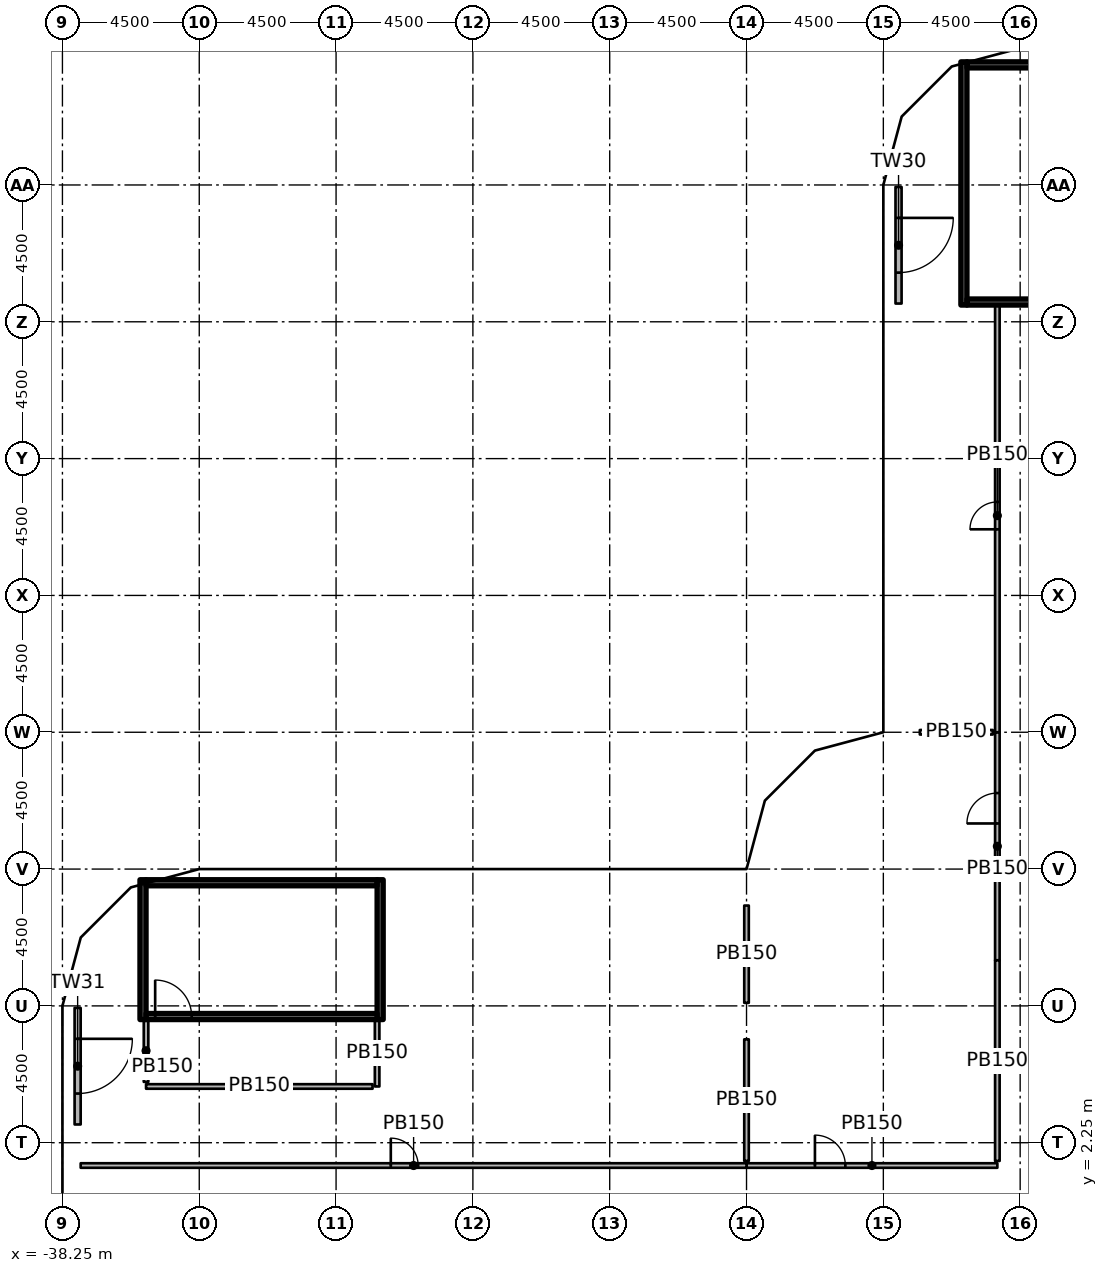
"""IFC4 building model, lengths in metres.
Left out: names, types, materials, properties, quantities, classifications, styles, units other than length and angle.
Written with IfcOpenShell. Run it as: python <this file> out.ifc"""

import sys

from ifc_helpers import new_model, si_unit, direction, frame, frame_2d, origin, origin_2d, place, context, subcontext, project, spatial, rectangle, extrude, element, fill, save


model = new_model("IFC4")
c1 = context("Model", 3, precision=1e-05, world=origin(), true_north=direction((0.0, 1.0)))
c2 = subcontext(c1, "Body", "Model", "MODEL_VIEW")
j1 = project(units=[si_unit("LENGTHUNIT", "METRE"), si_unit("PLANEANGLEUNIT", "RADIAN")], contexts=[c1])
p1 = place(None, origin())
s1 = spatial("IfcSite", under=j1, at=p1, CompositionType="ELEMENT")
p2 = place(p1, origin())
s2 = spatial("IfcBuilding", under=s1, at=p2, CompositionType="ELEMENT")
p3 = place(p2, frame((0.0, 0.0, 22.0)))
s3 = spatial("IfcBuildingStorey", under=s2, at=p3, CompositionType="ELEMENT", Elevation=22.0)
p4 = place(p3, frame((-37.65, 2.25, 0.0), z_axis=(0.0, 0.0, 1.0), x_axis=(1.0, 0.0, 0.0)))
e1 = element("IfcColumn", 1, at=p4, inside=s3, PredefinedType="COLUMN", context=c2, shape_type="SweptSolid", body=[
    extrude(rectangle(XDim=1.2, YDim=1.2, at=origin_2d()), origin(), (0.0, 0.0, 1.0), 4.55),
])
for number, where, z_axis, x_axis in (
    (2, (-33.11, 2.25, 0.0), (0.0, 0.0, 1.0), (1.0, 0.0, 0.0)),
    (3, (-28.908, 5.475, 0.0), (0.0, 0.0, 1.0), (1.0, 0.0, 0.0)),
    (4, (-24.75, 6.25, 0.0), (0.0, 0.0, 1.0), (1.0, 0.0, 0.0)),
    (5, (-20.25, 6.11, 0.0), (0.0, 0.0, 1.0), (1.0, 0.0, 0.0)),
):
    element("IfcColumn", number, at=place(p3, frame(where, z_axis=z_axis, x_axis=x_axis)), inside=s3, PredefinedType="COLUMN", context=c2, shape_type="SweptSolid", body=[
        extrude(rectangle(XDim=1.2, YDim=1.2, at=origin_2d()), origin(), (0.0, 0.0, 1.0), 4.85),
    ])
p5 = place(p3, frame((-20.25, 10.65, 0.0), z_axis=(0.0, 0.0, 1.0), x_axis=(1.0, 0.0, 0.0)))
e6 = element("IfcColumn", 6, at=p5, inside=s3, PredefinedType="COLUMN", context=c2, shape_type="SweptSolid", body=[
    extrude(rectangle(XDim=1.2, YDim=1.2, at=origin_2d()), origin(), (0.0, 0.0, 1.0), 4.55),
])
p6 = place(p3, frame((-15.75, 6.25, 0.0), z_axis=(0.0, 0.0, 1.0), x_axis=(1.0, 0.0, 0.0)))
e7 = element("IfcColumn", 7, at=p6, inside=s3, PredefinedType="COLUMN", context=c2, shape_type="SweptSolid", body=[
    extrude(rectangle(XDim=1.2, YDim=1.2, at=origin_2d()), origin(), (0.0, 0.0, 1.0), 4.85),
])
p7 = place(p3, frame((-15.15, 10.65, 0.0), z_axis=(0.0, 0.0, 1.0), x_axis=(1.0, 0.0, 0.0)))
e8 = element("IfcColumn", 8, at=p7, inside=s3, PredefinedType="COLUMN", context=c2, shape_type="SweptSolid", body=[
    extrude(rectangle(XDim=1.2, YDim=1.2, at=origin_2d()), origin(), (0.0, 0.0, 1.0), 4.55),
])
p8 = place(p3, frame((-10.75, 6.25, 0.0), z_axis=(0.0, 0.0, 1.0), x_axis=(1.0, 0.0, 0.0)))
e9 = element("IfcColumn", 9, at=p8, inside=s3, PredefinedType="COLUMN", context=c2, shape_type="SweptSolid", body=[
    extrude(rectangle(XDim=1.2, YDim=1.2, at=origin_2d()), origin(), (0.0, 0.0, 1.0), 4.85),
])
for number, where, z_axis, x_axis in (
    (10, (-10.65, 15.15, 0.0), (0.0, 0.0, 1.0), (1.0, 0.0, 0.0)),
    (11, (-10.65, 29.25, 0.0), (0.0, 0.0, 1.0), (1.0, 0.0, 0.0)),
):
    element("IfcColumn", number, at=place(p3, frame(where, z_axis=z_axis, x_axis=x_axis)), inside=s3, PredefinedType="COLUMN", context=c2, shape_type="SweptSolid", body=[
        extrude(rectangle(XDim=1.2, YDim=1.2, at=origin_2d()), origin(), (0.0, 0.0, 1.0), 4.55),
    ])
for number, where, z_axis, x_axis in (
    (12, (-6.25, 6.25, 0.0), (0.0, 0.0, 1.0), (1.0, 0.0, 0.0)),
    (13, (-6.25, 10.75, 0.0), (0.0, 0.0, 1.0), (1.0, 0.0, 0.0)),
    (14, (-6.25, 15.75, 0.0), (0.0, 0.0, 1.0), (1.0, 0.0, 0.0)),
    (15, (-6.25, 20.25, 0.0), (0.0, 0.0, 1.0), (1.0, 0.0, 0.0)),
    (16, (-6.25, 24.65, 0.0), (0.0, 0.0, 1.0), (1.0, 0.0, 0.0)),
    (17, (-6.25, 26.7, 0.0), (0.0, 0.0, 1.0), (1.0, 0.0, 0.0)),
):
    element("IfcColumn", number, at=place(p3, frame(where, z_axis=z_axis, x_axis=x_axis)), inside=s3, PredefinedType="COLUMN", context=c2, shape_type="SweptSolid", body=[
        extrude(rectangle(XDim=1.2, YDim=1.2, at=origin_2d()), origin(), (0.0, 0.0, 1.0), 4.85),
    ])
p9 = place(p3, frame((-10.75, 33.684, 0.0), z_axis=(0.0, 0.0, 1.0), x_axis=(0.0, -1.0, 0.0)))
e18 = element("IfcWall", 18, at=p9, inside=s3, PredefinedType="SOLIDWALL", context=c2, shape_type="SweptSolid", body=[
    extrude(rectangle(XDim=3.834, YDim=0.2, at=frame_2d((1.917, 0.0))), origin(), (0.0, 0.0, 1.0), 3.95),
])
p10 = place(p9, frame((1.017, 0.0, 0.0)))
e19 = element("IfcOpeningElement", 19, at=p10, cuts=e18, PredefinedType="OPENING", context=c2, shape_type="SweptSolid", body=[
    extrude(rectangle(XDim=1.8, YDim=2.4, at=frame_2d((0.9, 1.2))), frame((0.0, 0.11, 0.0), z_axis=(0.0, -1.0, 0.0), x_axis=(1.0, 0.0, 0.0)), (0.0, 0.0, 1.0), 0.22),
])
p11 = place(p3, frame((-37.75, 6.684, 0.0), z_axis=(0.0, 0.0, 1.0), x_axis=(0.0, -1.0, 0.0)))
e20 = element("IfcWall", 20, at=p11, inside=s3, PredefinedType="SOLIDWALL", context=c2, shape_type="SweptSolid", body=[
    extrude(rectangle(XDim=3.834, YDim=0.2, at=frame_2d((1.917, 0.0))), origin(), (0.0, 0.0, 1.0), 3.95),
])
p12 = place(p11, frame((1.017, 0.0, 0.0)))
e21 = element("IfcOpeningElement", 21, at=p12, cuts=e20, PredefinedType="OPENING", context=c2, shape_type="SweptSolid", body=[
    extrude(rectangle(XDim=1.8, YDim=2.4, at=frame_2d((0.9, 1.2))), frame((0.0, 0.11, 0.0), z_axis=(0.0, -1.0, 0.0), x_axis=(1.0, 0.0, 0.0)), (0.0, 0.0, 1.0), 0.22),
])
p13 = place(p3, frame((-8.6, 29.8, 0.0), z_axis=(0.0, 0.0, 1.0), x_axis=(0.0, 1.0, 0.0)))
e22 = element("IfcWall", 22, at=p13, inside=s3, PredefinedType="SHEAR", context=c2, shape_type="SweptSolid", body=[
    extrude(rectangle(XDim=8.0, YDim=0.2, at=frame_2d((4.0, 0.0))), origin(), (0.0, 0.0, 1.0), 4.55),
])
for number, where, z_axis, x_axis in (
    (23, (-8.5, 29.9, 0.0), (0.0, 0.0, 1.0), (1.0, 0.0, 0.0)),
    (24, (-8.5, 37.7, 0.0), (0.0, 0.0, 1.0), (1.0, 0.0, 0.0)),
):
    element("IfcWall", number, at=place(p3, frame(where, z_axis=z_axis, x_axis=x_axis)), inside=s3, PredefinedType="SHEAR", context=c2, shape_type="SweptSolid", body=[
        extrude(rectangle(XDim=4.2, YDim=0.2, at=frame_2d((2.1, 0.0))), origin(), (0.0, 0.0, 1.0), 4.55),
    ])
for number, where, z_axis, x_axis in (
    (25, (-35.6, 6.3, 0.0), (0.0, 0.0, 1.0), (0.0, 1.0, 0.0)),
    (26, (-27.8, 6.3, 0.0), (0.0, 0.0, 1.0), (0.0, 1.0, 0.0)),
):
    element("IfcWall", number, at=place(p3, frame(where, z_axis=z_axis, x_axis=x_axis)), inside=s3, PredefinedType="SHEAR", context=c2, shape_type="SweptSolid", body=[
        extrude(rectangle(XDim=4.6, YDim=0.2, at=frame_2d((2.3, 0.0))), origin(), (0.0, 0.0, 1.0), 4.55),
    ])
p14 = place(p3, frame((-35.5, 6.4, 0.0), z_axis=(0.0, 0.0, 1.0), x_axis=(1.0, 0.0, 0.0)))
e27 = element("IfcWall", 27, at=p14, inside=s3, PredefinedType="SHEAR", context=c2, shape_type="SweptSolid", body=[
    extrude(rectangle(XDim=7.6, YDim=0.2, at=frame_2d((3.8, 0.0))), origin(), (0.0, 0.0, 1.0), 4.55),
])
p15 = place(p14, frame((0.3, 0.0, 0.0)))
e28 = element("IfcOpeningElement", 28, at=p15, cuts=e27, PredefinedType="OPENING", context=c2, shape_type="SweptSolid", body=[
    extrude(rectangle(XDim=1.2, YDim=2.1, at=frame_2d((0.6, 1.05))), frame((0.0, 0.11, 0.0), z_axis=(0.0, -1.0, 0.0), x_axis=(1.0, 0.0, 0.0)), (0.0, 0.0, 1.0), 0.22),
])
p16 = place(p3, frame((-35.5, 10.8, 0.0), z_axis=(0.0, 0.0, 1.0), x_axis=(1.0, 0.0, 0.0)))
e29 = element("IfcWall", 29, at=p16, inside=s3, PredefinedType="SHEAR", context=c2, shape_type="SweptSolid", body=[
    extrude(rectangle(XDim=7.6, YDim=0.2, at=frame_2d((3.8, 0.0))), origin(), (0.0, 0.0, 1.0), 4.55),
])
p17 = place(p3, frame((-27.9, 6.3, 0.0), z_axis=(0.0, 0.0, 1.0), x_axis=(0.0, -1.0, 0.0)))
e30 = element("IfcWall", 30, at=p17, inside=s3, PredefinedType="PARTITIONING", context=c2, shape_type="SweptSolid", body=[
    extrude(rectangle(XDim=2.2, YDim=0.15, at=frame_2d((1.1, 0.0))), origin(), (0.0, 0.0, 1.0), 3.93),
])
p18 = place(p3, frame((-28.05, 4.1, 0.0), z_axis=(0.0, 0.0, 1.0), x_axis=(-1.0, 0.0, 0.0)))
e31 = element("IfcWall", 31, at=p18, inside=s3, PredefinedType="PARTITIONING", context=c2, shape_type="SweptSolid", body=[
    extrude(rectangle(XDim=7.45, YDim=0.15, at=frame_2d((3.725, 0.0))), origin(), (0.0, 0.0, 1.0), 3.93),
])
p19 = place(p3, frame((-35.5, 4.25, 0.0), z_axis=(0.0, 0.0, 1.0), x_axis=(0.0, 1.0, 0.0)))
e32 = element("IfcWall", 32, at=p19, inside=s3, PredefinedType="PARTITIONING", context=c2, shape_type="SweptSolid", body=[
    extrude(rectangle(XDim=2.05, YDim=0.15, at=frame_2d((1.025, 0.0))), origin(), (0.0, 0.0, 1.0), 4.55),
])
p20 = place(p3, frame((-7.5, 8.25, 0.0), z_axis=(0.0, 0.0, 1.0), x_axis=(0.0, 1.0, 0.0)))
e33 = element("IfcWall", 33, at=p20, inside=s3, PredefinedType="PARTITIONING", context=c2, shape_type="SweptSolid", body=[
    extrude(rectangle(XDim=7.5, YDim=0.15, at=frame_2d((3.75, 0.0))), origin(), (0.0, 0.0, 1.0), 3.93),
])
p21 = place(p20, frame((4.5, 0.0, 0.0)))
e34 = element("IfcOpeningElement", 34, at=p21, cuts=e33, PredefinedType="OPENING", context=c2, shape_type="SweptSolid", body=[
    extrude(rectangle(XDim=1.0, YDim=2.1, at=frame_2d((0.5, 1.05))), frame((0.0, 0.085, 0.0), z_axis=(0.0, -1.0, 0.0), x_axis=(1.0, 0.0, 0.0)), (0.0, 0.0, 1.0), 0.17),
])
p22 = place(p3, frame((-7.5, 15.75, 0.0), z_axis=(0.0, 0.0, 1.0), x_axis=(0.0, 1.0, 0.0)))
e35 = element("IfcWall", 35, at=p22, inside=s3, PredefinedType="PARTITIONING", context=c2, shape_type="SweptSolid", body=[
    extrude(rectangle(XDim=14.25, YDim=0.15, at=frame_2d((7.125, 0.0))), origin(), (0.0, 0.0, 1.0), 4.55),
])
p23 = place(p22, frame((6.675, 0.0, 0.0)))
e36 = element("IfcOpeningElement", 36, at=p23, cuts=e35, PredefinedType="OPENING", context=c2, shape_type="SweptSolid", body=[
    extrude(rectangle(XDim=0.9, YDim=2.1, at=frame_2d((0.45, 1.05))), frame((0.0, 0.085, 0.0), z_axis=(0.0, -1.0, 0.0), x_axis=(1.0, 0.0, 0.0)), (0.0, 0.0, 1.0), 0.17),
])
p24 = place(p3, frame((-15.75, 1.5, 0.0), z_axis=(0.0, 0.0, 1.0), x_axis=(1.0, 0.0, 0.0)))
e37 = element("IfcWall", 37, at=p24, inside=s3, PredefinedType="PARTITIONING", context=c2, shape_type="SweptSolid", body=[
    extrude(rectangle(XDim=8.25, YDim=0.15, at=frame_2d((4.125, 0.0))), origin(), (0.0, 0.0, 1.0), 4.063),
])
p25 = place(p24, frame((2.25, 0.0, 0.0)))
e38 = element("IfcOpeningElement", 38, at=p25, cuts=e37, PredefinedType="OPENING", context=c2, shape_type="SweptSolid", body=[
    extrude(rectangle(XDim=1.0, YDim=2.1, at=frame_2d((0.5, 1.05))), frame((0.0, 0.085, 0.0), z_axis=(0.0, -1.0, 0.0), x_axis=(1.0, 0.0, 0.0)), (0.0, 0.0, 1.0), 0.17),
])
p26 = place(p3, frame((-37.65, 1.5, 0.0), z_axis=(0.0, 0.0, 1.0), x_axis=(1.0, 0.0, 0.0)))
e39 = element("IfcWall", 39, at=p26, inside=s3, PredefinedType="PARTITIONING", context=c2, shape_type="SweptSolid", body=[
    extrude(rectangle(XDim=21.9, YDim=0.15, at=frame_2d((10.95, 0.0))), origin(), (0.0, 0.0, 1.0), 3.93),
])
p27 = place(p26, frame((10.2, 0.0, 0.0)))
e40 = element("IfcOpeningElement", 40, at=p27, cuts=e39, PredefinedType="OPENING", context=c2, shape_type="SweptSolid", body=[
    extrude(rectangle(XDim=0.9, YDim=2.1, at=frame_2d((0.45, 1.05))), frame((0.0, 0.085, 0.0), z_axis=(0.0, -1.0, 0.0), x_axis=(1.0, 0.0, 0.0)), (0.0, 0.0, 1.0), 0.17),
])
p28 = place(p3, frame((-15.75, 1.65, 0.0), z_axis=(0.0, 0.0, 1.0), x_axis=(0.0, 1.0, 0.0)))
e41 = element("IfcWall", 41, at=p28, inside=s3, PredefinedType="PARTITIONING", context=c2, shape_type="SweptSolid", body=[
    extrude(rectangle(XDim=4.0, YDim=0.15, at=frame_2d((2.0, 0.0))), origin(), (0.0, 0.0, 1.0), 4.063),
])
p29 = place(p3, frame((-15.75, 6.85, 0.0), z_axis=(0.0, 0.0, 1.0), x_axis=(0.0, 1.0, 0.0)))
e42 = element("IfcWall", 42, at=p29, inside=s3, PredefinedType="PARTITIONING", context=c2, shape_type="SweptSolid", body=[
    extrude(rectangle(XDim=3.2, YDim=0.15, at=frame_2d((1.6, 0.0))), origin(), (0.0, 0.0, 1.0), 4.55),
])
p30 = place(p3, frame((-10.05, 15.75, 0.0), z_axis=(0.0, 0.0, 1.0), x_axis=(1.0, 0.0, 0.0)))
e43 = element("IfcWall", 43, at=p30, inside=s3, PredefinedType="PARTITIONING", context=c2, shape_type="SweptSolid", body=[
    extrude(rectangle(XDim=2.4, YDim=0.15, at=frame_2d((1.2, 0.0))), origin(), (0.0, 0.0, 1.0), 4.55),
])
p31 = place(p3, frame((-7.5, 8.25, 0.0), z_axis=(0.0, 0.0, 1.0), x_axis=(0.0, -1.0, 0.0)))
e44 = element("IfcWall", 44, at=p31, inside=s3, PredefinedType="PARTITIONING", context=c2, shape_type="SweptSolid", body=[
    extrude(rectangle(XDim=6.6, YDim=0.15, at=frame_2d((3.3, 0.0))), origin(), (0.0, 0.0, 1.0), 3.911),
])
p32 = place(p10, origin())
e45 = element("IfcDoor", 45, at=p32, inside=s3, OperationType="SINGLE_SWING_LEFT", PredefinedType="DOOR", context=c2, shape_type="SweptSolid", body=[
    extrude(rectangle(XDim=1.8, YDim=2.4, at=frame_2d((0.9, 1.2))), frame((0.0, 0.025, 0.0), z_axis=(0.0, -1.0, 0.0), x_axis=(1.0, 0.0, 0.0)), (0.0, 0.0, 1.0), 0.05),
])
fill(e19, e45)
p33 = place(p12, origin())
e46 = element("IfcDoor", 46, at=p33, inside=s3, OperationType="SINGLE_SWING_LEFT", PredefinedType="DOOR", context=c2, shape_type="SweptSolid", body=[
    extrude(rectangle(XDim=1.8, YDim=2.4, at=frame_2d((0.9, 1.2))), frame((0.0, 0.025, 0.0), z_axis=(0.0, -1.0, 0.0), x_axis=(1.0, 0.0, 0.0)), (0.0, 0.0, 1.0), 0.05),
])
fill(e21, e46)
p34 = place(p15, origin())
e47 = element("IfcDoor", 47, at=p34, inside=s3, OperationType="SINGLE_SWING_RIGHT", PredefinedType="DOOR", context=c2, shape_type="SweptSolid", body=[
    extrude(rectangle(XDim=1.2, YDim=2.1, at=frame_2d((0.6, 1.05))), frame((0.0, 0.025, 0.0), z_axis=(0.0, -1.0, 0.0), x_axis=(1.0, 0.0, 0.0)), (0.0, 0.0, 1.0), 0.05),
])
fill(e28, e47)
p35 = place(p21, origin())
e48 = element("IfcDoor", 48, at=p35, inside=s3, OperationType="SINGLE_SWING_LEFT", PredefinedType="DOOR", context=c2, shape_type="SweptSolid", body=[
    extrude(rectangle(XDim=1.0, YDim=2.1, at=frame_2d((0.5, 1.05))), frame((0.0, 0.025, 0.0), z_axis=(0.0, -1.0, 0.0), x_axis=(1.0, 0.0, 0.0)), (0.0, 0.0, 1.0), 0.05),
])
fill(e34, e48)
p36 = place(p23, origin())
e49 = element("IfcDoor", 49, at=p36, inside=s3, OperationType="SINGLE_SWING_LEFT", PredefinedType="DOOR", context=c2, shape_type="SweptSolid", body=[
    extrude(rectangle(XDim=0.9, YDim=2.1, at=frame_2d((0.45, 1.05))), frame((0.0, 0.025, 0.0), z_axis=(0.0, -1.0, 0.0), x_axis=(1.0, 0.0, 0.0)), (0.0, 0.0, 1.0), 0.05),
])
fill(e36, e49)
p37 = place(p25, origin())
e50 = element("IfcDoor", 50, at=p37, inside=s3, OperationType="SINGLE_SWING_LEFT", PredefinedType="DOOR", context=c2, shape_type="SweptSolid", body=[
    extrude(rectangle(XDim=1.0, YDim=2.1, at=frame_2d((0.5, 1.05))), frame((0.0, 0.025, 0.0), z_axis=(0.0, -1.0, 0.0), x_axis=(1.0, 0.0, 0.0)), (0.0, 0.0, 1.0), 0.05),
])
fill(e38, e50)
p38 = place(p27, origin())
e51 = element("IfcDoor", 51, at=p38, inside=s3, OperationType="SINGLE_SWING_LEFT", PredefinedType="DOOR", context=c2, shape_type="SweptSolid", body=[
    extrude(rectangle(XDim=0.9, YDim=2.1, at=frame_2d((0.45, 1.05))), frame((0.0, 0.025, 0.0), z_axis=(0.0, -1.0, 0.0), x_axis=(1.0, 0.0, 0.0)), (0.0, 0.0, 1.0), 0.05),
])
fill(e40, e51)
save(model, sys.argv[1])
